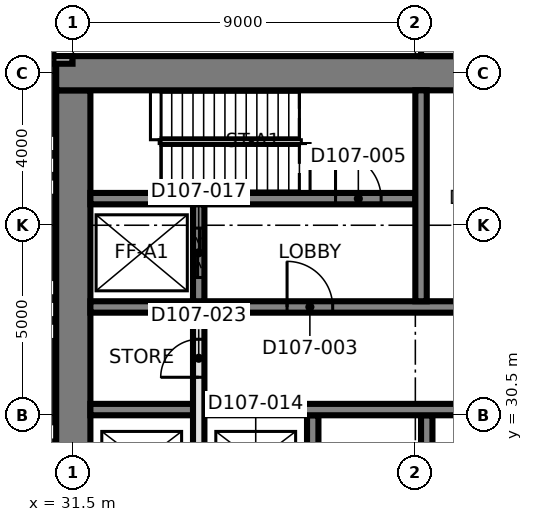
"""IFC4 building model, lengths in metres.
Left out: names, types, materials, properties, quantities, classifications, styles, units other than length and angle.
Written with IfcOpenShell. Run it as: python <this file> out.ifc"""

import sys

from ifc_helpers import new_model, si_unit, direction, frame, frame_2d, origin, place, context, subcontext, project, spatial, rectangle, extrude, element, fill, save


model = new_model("IFC4")
c1 = context("Model", 3, precision=1e-05, world=origin(), true_north=direction((0.0, 1.0)))
c2 = subcontext(c1, "Body", "Model", "MODEL_VIEW")
j1 = project(units=[si_unit("LENGTHUNIT", "METRE"), si_unit("PLANEANGLEUNIT", "RADIAN")], contexts=[c1])
p1 = place(None, origin())
s1 = spatial("IfcSite", under=j1, at=p1, CompositionType="ELEMENT")
p2 = place(p1, origin())
s2 = spatial("IfcBuilding", under=s1, at=p2, CompositionType="ELEMENT")
p3 = place(p2, frame((0.0, 0.0, 28.5)))
s3 = spatial("IfcBuildingStorey", under=s2, at=p3, CompositionType="ELEMENT", Elevation=28.5)
p4 = place(p3, frame((31.5, 21.95, 0.0), z_axis=(0.0, 0.0, 1.0), x_axis=(0.0, 1.0, 0.0)))
e1 = element("IfcWall", 1, at=p4, inside=s3, PredefinedType="SHEAR", context=c2, shape_type="SweptSolid", body=[
    extrude(rectangle(XDim=17.1, YDim=0.9, at=frame_2d((8.55, 0.0))), origin(), (0.0, 0.0, 1.0), 5.0),
])
p5 = place(p3, frame((31.05, 39.5, 0.0), z_axis=(0.0, 0.0, 1.0), x_axis=(1.0, 0.0, 0.0)))
e2 = element("IfcWall", 2, at=p5, inside=s3, PredefinedType="SHEAR", context=c2, shape_type="SweptSolid", body=[
    extrude(rectangle(XDim=27.0, YDim=0.9, at=frame_2d((13.5, 0.0))), origin(), (0.0, 0.0, 1.0), 5.0),
])
p6 = place(p3, frame((37.8, 21.95, 0.0), z_axis=(0.0, 0.0, 1.0), x_axis=(0.0, 1.0, 0.0)))
e3 = element("IfcWall", 3, at=p6, inside=s3, PredefinedType="SHEAR", context=c2, shape_type="SweptSolid", body=[
    extrude(rectangle(XDim=8.55, YDim=0.3, at=frame_2d((4.275, 0.0))), origin(), (0.0, 0.0, 1.0), 5.0),
])
p7 = place(p6, frame((3.7, 0.0, 0.0)))
e4 = element("IfcOpeningElement", 4, at=p7, cuts=e3, PredefinedType="OPENING", context=c2, shape_type="SweptSolid", body=[
    extrude(rectangle(XDim=1.5, YDim=2.1, at=frame_2d((0.75, 1.05))), frame((0.0, 0.16, 0.0), z_axis=(0.0, -1.0, 0.0), x_axis=(1.0, 0.0, 0.0)), (0.0, 0.0, 1.0), 0.32),
])
p8 = place(p3, frame((40.8, 21.95, 0.0), z_axis=(0.0, 0.0, 1.0), x_axis=(0.0, 1.0, 0.0)))
e5 = element("IfcWall", 5, at=p8, inside=s3, PredefinedType="SHEAR", context=c2, shape_type="SweptSolid", body=[
    extrude(rectangle(XDim=8.55, YDim=0.3, at=frame_2d((4.275, 0.0))), origin(), (0.0, 0.0, 1.0), 5.0),
])
p9 = place(p3, frame((31.95, 30.65, 0.0), z_axis=(0.0, 0.0, 1.0), x_axis=(1.0, 0.0, 0.0)))
e6 = element("IfcWall", 6, at=p9, inside=s3, PredefinedType="SHEAR", context=c2, shape_type="SweptSolid", body=[
    extrude(rectangle(XDim=26.1, YDim=0.3, at=frame_2d((13.05, 0.0))), origin(), (0.0, 0.0, 1.0), 5.0),
])
p10 = place(p9, frame((24.55, 0.0, 0.0)))
e7 = element("IfcOpeningElement", 7, at=p10, cuts=e6, PredefinedType="OPENING", context=c2, shape_type="SweptSolid", body=[
    extrude(rectangle(XDim=1.0, YDim=2.1, at=frame_2d((0.5, 1.05))), frame((0.0, 0.16, 0.0), z_axis=(0.0, -1.0, 0.0), x_axis=(1.0, 0.0, 0.0)), (0.0, 0.0, 1.0), 0.32),
])
p11 = place(p9, frame((11.35, 0.0, 0.0)))
e8 = element("IfcOpeningElement", 8, at=p11, cuts=e6, PredefinedType="OPENING", context=c2, shape_type="SweptSolid", body=[
    extrude(rectangle(XDim=1.0, YDim=2.1, at=frame_2d((0.5, 1.05))), frame((0.0, 0.16, 0.0), z_axis=(0.0, -1.0, 0.0), x_axis=(1.0, 0.0, 0.0)), (0.0, 0.0, 1.0), 0.32),
])
p12 = place(p3, frame((31.95, 33.35, 0.0), z_axis=(0.0, 0.0, 1.0), x_axis=(1.0, 0.0, 0.0)))
e9 = element("IfcWall", 9, at=p12, inside=s3, PredefinedType="SHEAR", context=c2, shape_type="SweptSolid", body=[
    extrude(rectangle(XDim=26.1, YDim=0.3, at=frame_2d((13.05, 0.0))), origin(), (0.0, 0.0, 1.0), 5.0),
])
p13 = place(p12, frame((13.7, 0.0, 0.0)))
e10 = element("IfcOpeningElement", 10, at=p13, cuts=e9, PredefinedType="OPENING", context=c2, shape_type="SweptSolid", body=[
    extrude(rectangle(XDim=1.4, YDim=2.1, at=frame_2d((0.7, 1.05))), frame((0.0, 0.16, 0.0), z_axis=(0.0, -1.0, 0.0), x_axis=(1.0, 0.0, 0.0)), (0.0, 0.0, 1.0), 0.32),
])
p14 = place(p12, frame((5.175, 0.0, 0.0)))
e11 = element("IfcOpeningElement", 11, at=p14, cuts=e9, PredefinedType="OPENING", context=c2, shape_type="SweptSolid", body=[
    extrude(rectangle(XDim=1.2, YDim=2.1, at=frame_2d((0.6, 1.05))), frame((0.0, 0.16, 0.0), z_axis=(0.0, -1.0, 0.0), x_axis=(1.0, 0.0, 0.0)), (0.0, 0.0, 1.0), 0.32),
])
p15 = place(p12, frame((19.725, 0.0, 0.0)))
e12 = element("IfcOpeningElement", 12, at=p15, cuts=e9, PredefinedType="OPENING", context=c2, shape_type="SweptSolid", body=[
    extrude(rectangle(XDim=1.2, YDim=2.1, at=frame_2d((0.6, 1.05))), frame((0.0, 0.16, 0.0), z_axis=(0.0, -1.0, 0.0), x_axis=(1.0, 0.0, 0.0)), (0.0, 0.0, 1.0), 0.32),
])
p16 = place(p3, frame((31.95, 36.2, 0.0), z_axis=(0.0, 0.0, 1.0), x_axis=(1.0, 0.0, 0.0)))
e13 = element("IfcWall", 13, at=p16, inside=s3, PredefinedType="SHEAR", context=c2, shape_type="SweptSolid", body=[
    extrude(rectangle(XDim=8.55, YDim=0.3, at=frame_2d((4.275, 0.0))), origin(), (0.0, 0.0, 1.0), 5.0),
])
p17 = place(p16, frame((6.45, 0.0, 0.0)))
e14 = element("IfcOpeningElement", 14, at=p17, cuts=e13, PredefinedType="OPENING", context=c2, shape_type="SweptSolid", body=[
    extrude(rectangle(XDim=1.2, YDim=2.1, at=frame_2d((0.6, 1.05))), frame((0.0, 0.16, 0.0), z_axis=(0.0, -1.0, 0.0), x_axis=(1.0, 0.0, 0.0)), (0.0, 0.0, 1.0), 0.32),
])
p18 = place(p3, frame((40.65, 33.5, 0.0), z_axis=(0.0, 0.0, 1.0), x_axis=(0.0, 1.0, 0.0)))
e15 = element("IfcWall", 15, at=p18, inside=s3, PredefinedType="SHEAR", context=c2, shape_type="SweptSolid", body=[
    extrude(rectangle(XDim=5.55, YDim=0.3, at=frame_2d((2.775, 0.0))), origin(), (0.0, 0.0, 1.0), 5.0),
])
p19 = place(p3, frame((34.8, 33.5, 0.0), z_axis=(0.0, 0.0, 1.0), x_axis=(0.0, 1.0, 0.0)))
e16 = element("IfcWall", 16, at=p19, inside=s3, PredefinedType="SHEAR", context=c2, shape_type="SweptSolid", body=[
    extrude(rectangle(XDim=2.55, YDim=0.3, at=frame_2d((1.275, 0.0))), origin(), (0.0, 0.0, 1.0), 5.0),
])
p20 = place(p19, frame((0.625, 0.0, 0.0)))
e17 = element("IfcOpeningElement", 17, at=p20, cuts=e16, PredefinedType="OPENING", context=c2, shape_type="SweptSolid", body=[
    extrude(rectangle(XDim=1.3, YDim=2.4, at=frame_2d((0.65, 1.2))), frame((0.0, 0.16, 0.0), z_axis=(0.0, -1.0, 0.0), x_axis=(1.0, 0.0, 0.0)), (0.0, 0.0, 1.0), 0.32),
])
p21 = place(p3, frame((40.65, 40.1, 0.0), z_axis=(0.0, 0.0, 1.0), x_axis=(1.0, 0.0, 0.0)))
e18 = element("IfcWall", 18, at=p21, inside=s3, PredefinedType="PARTITIONING", context=c2, shape_type="SweptSolid", body=[
    extrude(rectangle(XDim=2.7, YDim=0.3, at=frame_2d((1.35, 0.0))), origin(), (0.0, 0.0, 1.0), 4.7),
])
p22 = place(p3, frame((34.8, 27.9, 0.0), z_axis=(0.0, 0.0, 1.0), x_axis=(0.0, 1.0, 0.0)))
e19 = element("IfcWall", 19, at=p22, inside=s3, PredefinedType="SOLIDWALL", context=c2, shape_type="SweptSolid", body=[
    extrude(rectangle(XDim=5.45, YDim=0.3, at=frame_2d((2.725, 0.0))), origin(), (0.0, 0.0, 1.0), 4.7),
])
p23 = place(p22, frame((3.6, 0.0, 0.0)))
e20 = element("IfcOpeningElement", 20, at=p23, cuts=e19, PredefinedType="OPENING", context=c2, shape_type="SweptSolid", body=[
    extrude(rectangle(XDim=1.0, YDim=2.1, at=frame_2d((0.5, 1.05))), frame((0.0, 0.16, 0.0), z_axis=(0.0, -1.0, 0.0), x_axis=(1.0, 0.0, 0.0)), (0.0, 0.0, 1.0), 0.32),
])
p24 = place(p3, frame((21.07, 39.85, 0.0), z_axis=(0.0, 0.0, 1.0), x_axis=(1.0, 0.0, 0.0)))
e21 = element("IfcWall", 21, at=p24, inside=s3, PredefinedType="PARTITIONING", context=c2, shape_type="SweptSolid", body=[
    extrude(rectangle(XDim=10.41, YDim=0.2, at=frame_2d((5.205, 0.0))), origin(), (0.0, 0.0, 1.0), 4.7),
])
p25 = place(p24, frame((4.557, 0.0, 0.0)))
e22 = element("IfcOpeningElement", 22, at=p25, cuts=e21, PredefinedType="OPENING", context=c2, shape_type="SweptSolid", body=[
    extrude(rectangle(XDim=1.0, YDim=2.1, at=frame_2d((0.5, 1.05))), frame((0.0, 0.11, 0.0), z_axis=(0.0, -1.0, 0.0), x_axis=(1.0, 0.0, 0.0)), (0.0, 0.0, 1.0), 0.22),
])
p26 = place(p14, origin())
e23 = element("IfcDoor", 23, at=p26, inside=s3, OperationType="SINGLE_SWING_LEFT", PredefinedType="DOOR", context=c2, shape_type="SweptSolid", body=[
    extrude(rectangle(XDim=1.2, YDim=2.1, at=frame_2d((0.6, 1.05))), frame((0.0, 0.025, 0.0), z_axis=(0.0, -1.0, 0.0), x_axis=(1.0, 0.0, 0.0)), (0.0, 0.0, 1.0), 0.05),
])
fill(e11, e23)
p27 = place(p17, origin())
e24 = element("IfcDoor", 24, at=p27, inside=s3, OperationType="SINGLE_SWING_RIGHT", PredefinedType="DOOR", context=c2, shape_type="SweptSolid", body=[
    extrude(rectangle(XDim=1.2, YDim=2.1, at=frame_2d((0.6, 1.05))), frame((0.0, 0.025, 0.0), z_axis=(0.0, -1.0, 0.0), x_axis=(1.0, 0.0, 0.0)), (0.0, 0.0, 1.0), 0.05),
])
fill(e14, e24)
p28 = place(p20, origin())
e25 = element("IfcDoor", 25, at=p28, inside=s3, OperationType="SLIDING_TO_LEFT", PredefinedType="DOOR", context=c2, shape_type="SweptSolid", body=[
    extrude(rectangle(XDim=1.3, YDim=2.4, at=frame_2d((0.65, 1.2))), frame((0.0, 0.025, 0.0), z_axis=(0.0, -1.0, 0.0), x_axis=(1.0, 0.0, 0.0)), (0.0, 0.0, 1.0), 0.05),
])
fill(e17, e25)
p29 = place(p23, origin())
e26 = element("IfcDoor", 26, at=p29, inside=s3, OperationType="SINGLE_SWING_LEFT", PredefinedType="DOOR", context=c2, shape_type="SweptSolid", body=[
    extrude(rectangle(XDim=1.0, YDim=2.1, at=frame_2d((0.5, 1.05))), frame((0.0, 0.025, 0.0), z_axis=(0.0, -1.0, 0.0), x_axis=(1.0, 0.0, 0.0)), (0.0, 0.0, 1.0), 0.05),
])
fill(e20, e26)
save(model, sys.argv[1])
